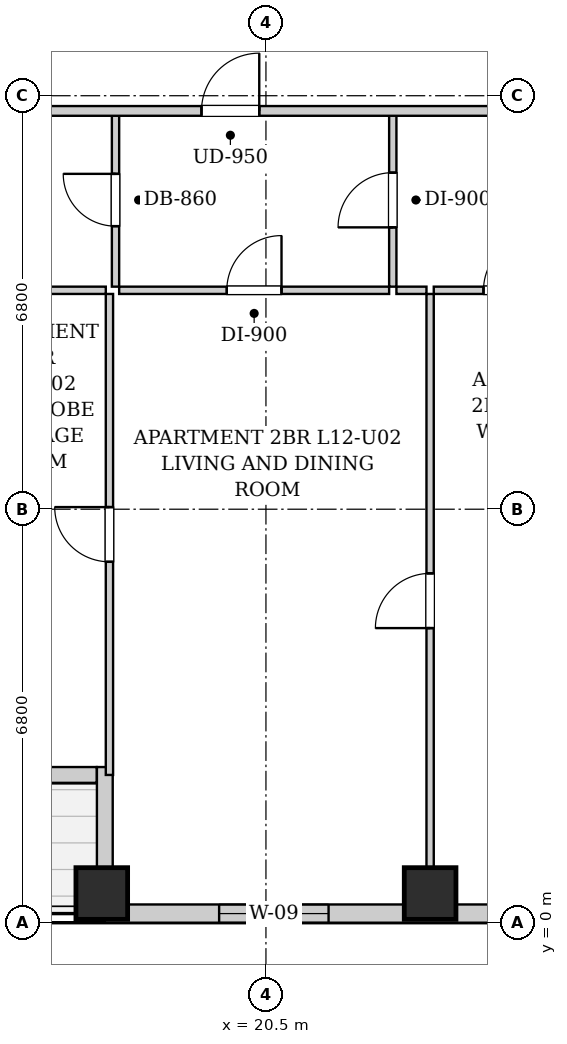
"""IFC4 building model, lengths in metres.
Left out: names, types, materials, properties, quantities, classifications, styles, units other than length and angle.
Written with IfcOpenShell. Run it as: python <this file> out.ifc"""

import sys

from ifc_helpers import new_model, si_unit, direction, frame, frame_2d, origin, origin_2d, place, context, subcontext, project, spatial, rectangle, extrude, element, fill, save


model = new_model("IFC4")
c1 = context("Model", 3, precision=1e-05, world=origin(), true_north=direction((0.0, 1.0)))
c2 = subcontext(c1, "Body", "Model", "MODEL_VIEW")
j1 = project(units=[si_unit("LENGTHUNIT", "METRE"), si_unit("PLANEANGLEUNIT", "RADIAN")], contexts=[c1])
p1 = place(None, origin())
s1 = spatial("IfcSite", under=j1, at=p1, CompositionType="ELEMENT")
p2 = place(p1, origin())
s2 = spatial("IfcBuilding", under=s1, at=p2, CompositionType="ELEMENT")
p3 = place(p2, frame((0.0, 0.0, 48.2)))
s3 = spatial("IfcBuildingStorey", under=s2, at=p3, CompositionType="ELEMENT", Elevation=48.2)
for number, where, z_axis, x_axis in (
    (1, (17.8, 0.48, 0.0), (0.0, 0.0, 1.0), (1.0, 0.0, 0.0)),
    (2, (23.2, 0.48, 0.0), (0.0, 0.0, 1.0), (1.0, 0.0, 0.0)),
):
    element("IfcColumn", number, at=place(p3, frame(where, z_axis=z_axis, x_axis=x_axis)), inside=s3, PredefinedType="COLUMN", context=c2, shape_type="SweptSolid", body=[
        extrude(rectangle(XDim=0.85, YDim=0.85, at=origin_2d()), origin(), (0.0, 0.0, 1.0), 3.2),
    ])
p4 = place(p3, frame((44.0, 0.15, 0.0), z_axis=(0.0, 0.0, 1.0), x_axis=(-1.0, 0.0, 0.0)))
e3 = element("IfcWall", 3, at=p4, inside=s3, PredefinedType="SOLIDWALL", context=c2, shape_type="SweptSolid", body=[
    extrude(rectangle(XDim=26.15, YDim=0.3, at=frame_2d((13.075, 0.0))), origin(), (0.0, 0.0, 1.0), 1.975),
])
p5 = place(p4, frame((22.47, 0.0, 0.55)))
e4 = element("IfcOpeningElement", 4, at=p5, cuts=e3, PredefinedType="OPENING", context=c2, shape_type="SweptSolid", body=[
    extrude(rectangle(XDim=1.8, YDim=1.2, at=frame_2d((0.9, 0.6))), frame((0.0, 0.16, 0.0), z_axis=(0.0, -1.0, 0.0), x_axis=(1.0, 0.0, 0.0)), (0.0, 0.0, 1.0), 0.32),
])
p6 = place(p4, frame((14.354, 0.0, 0.55)))
e5 = element("IfcOpeningElement", 5, at=p6, cuts=e3, PredefinedType="OPENING", context=c2, shape_type="SweptSolid", body=[
    extrude(rectangle(XDim=1.8, YDim=1.2, at=frame_2d((0.9, 0.6))), frame((0.0, 0.16, 0.0), z_axis=(0.0, -1.0, 0.0), x_axis=(1.0, 0.0, 0.0)), (0.0, 0.0, 1.0), 0.32),
])
p7 = place(p4, frame((11.385, 0.0, 0.55)))
e6 = element("IfcOpeningElement", 6, at=p7, cuts=e3, PredefinedType="OPENING", context=c2, shape_type="SweptSolid", body=[
    extrude(rectangle(XDim=1.35, YDim=1.2, at=frame_2d((0.675, 0.6))), frame((0.0, 0.16, 0.0), z_axis=(0.0, -1.0, 0.0), x_axis=(1.0, 0.0, 0.0)), (0.0, 0.0, 1.0), 0.32),
])
p8 = place(p4, frame((6.839, 0.0, 0.55)))
e7 = element("IfcOpeningElement", 7, at=p8, cuts=e3, PredefinedType="OPENING", context=c2, shape_type="SweptSolid", body=[
    extrude(rectangle(XDim=1.8, YDim=1.2, at=frame_2d((0.9, 0.6))), frame((0.0, 0.16, 0.0), z_axis=(0.0, -1.0, 0.0), x_axis=(1.0, 0.0, 0.0)), (0.0, 0.0, 1.0), 0.32),
])
p9 = place(p4, frame((2.332, 0.0, 0.55)))
e8 = element("IfcOpeningElement", 8, at=p9, cuts=e3, PredefinedType="OPENING", context=c2, shape_type="SweptSolid", body=[
    extrude(rectangle(XDim=1.8, YDim=1.2, at=frame_2d((0.9, 0.6))), frame((0.0, 0.16, 0.0), z_axis=(0.0, -1.0, 0.0), x_axis=(1.0, 0.0, 0.0)), (0.0, 0.0, 1.0), 0.32),
])
p10 = place(p3, frame((17.85, 0.16, 0.0), z_axis=(0.0, 0.0, 1.0), x_axis=(0.0, 1.0, 0.0)))
e9 = element("IfcWall", 9, at=p10, inside=s3, PredefinedType="SOLIDWALL", context=c2, shape_type="SweptSolid", body=[
    extrude(rectangle(XDim=2.4, YDim=0.26, at=frame_2d((1.2, 0.0))), origin(), (0.0, 0.0, 1.0), 2.232),
])
p11 = place(p3, frame((17.716, 2.43, 0.0), z_axis=(0.0, 0.0, 1.0), x_axis=(-1.0, 0.0, 0.0)))
e10 = element("IfcWall", 10, at=p11, inside=s3, PredefinedType="SOLIDWALL", context=c2, shape_type="SweptSolid", body=[
    extrude(rectangle(XDim=4.332, YDim=0.26, at=frame_2d((2.166, 0.0))), origin(), (0.0, 0.0, 1.0), 2.94),
])
p12 = place(p11, frame((0.95, 0.0, 0.0)))
e11 = element("IfcOpeningElement", 11, at=p12, cuts=e10, PredefinedType="OPENING", context=c2, shape_type="SweptSolid", body=[
    extrude(rectangle(XDim=1.1, YDim=2.0, at=frame_2d((0.55, 1.0))), frame((0.0, 0.14, 0.0), z_axis=(0.0, -1.0, 0.0), x_axis=(1.0, 0.0, 0.0)), (0.0, 0.0, 1.0), 0.28),
])
p13 = place(p3, frame((18.026, 10.46, 0.0), z_axis=(0.0, 0.0, 1.0), x_axis=(0.0, 1.0, 0.0)))
e12 = element("IfcWall", 12, at=p13, inside=s3, PredefinedType="PARTITIONING", context=c2, shape_type="SweptSolid", body=[
    extrude(rectangle(XDim=2.85, YDim=0.12, at=frame_2d((1.425, 0.0))), origin(), (0.0, 0.0, 1.0), 2.94),
])
p14 = place(p13, frame((0.995, 0.0, 0.0)))
e13 = element("IfcOpeningElement", 13, at=p14, cuts=e12, PredefinedType="OPENING", context=c2, shape_type="SweptSolid", body=[
    extrude(rectangle(XDim=0.86, YDim=2.05, at=frame_2d((0.43, 1.025))), frame((0.0, 0.07, 0.0), z_axis=(0.0, -1.0, 0.0), x_axis=(1.0, 0.0, 0.0)), (0.0, 0.0, 1.0), 0.14),
])
p15 = place(p3, frame((15.566, 10.4, 0.0), z_axis=(0.0, 0.0, 1.0), x_axis=(1.0, 0.0, 0.0)))
e14 = element("IfcWall", 14, at=p15, inside=s3, PredefinedType="PARTITIONING", context=c2, shape_type="SweptSolid", body=[
    extrude(rectangle(XDim=2.3, YDim=0.12, at=frame_2d((1.15, 0.0))), origin(), (0.0, 0.0, 1.0), 2.94),
])
p16 = place(p3, frame((22.586, 10.46, 0.0), z_axis=(0.0, 0.0, 1.0), x_axis=(0.0, 1.0, 0.0)))
e15 = element("IfcWall", 15, at=p16, inside=s3, PredefinedType="PARTITIONING", context=c2, shape_type="SweptSolid", body=[
    extrude(rectangle(XDim=2.85, YDim=0.12, at=frame_2d((1.425, 0.0))), origin(), (0.0, 0.0, 1.0), 2.94),
])
p17 = place(p16, frame((0.975, 0.0, 0.0)))
e16 = element("IfcOpeningElement", 16, at=p17, cuts=e15, PredefinedType="OPENING", context=c2, shape_type="SweptSolid", body=[
    extrude(rectangle(XDim=0.9, YDim=2.05, at=frame_2d((0.45, 1.025))), frame((0.0, 0.07, 0.0), z_axis=(0.0, -1.0, 0.0), x_axis=(1.0, 0.0, 0.0)), (0.0, 0.0, 1.0), 0.14),
])
p18 = place(p3, frame((18.086, 10.4, 0.0), z_axis=(0.0, 0.0, 1.0), x_axis=(1.0, 0.0, 0.0)))
e17 = element("IfcWall", 17, at=p18, inside=s3, PredefinedType="PARTITIONING", context=c2, shape_type="SweptSolid", body=[
    extrude(rectangle(XDim=4.44, YDim=0.12, at=frame_2d((2.22, 0.0))), origin(), (0.0, 0.0, 1.0), 2.94),
])
p19 = place(p18, frame((1.77, 0.0, 0.0)))
e18 = element("IfcOpeningElement", 18, at=p19, cuts=e17, PredefinedType="OPENING", context=c2, shape_type="SweptSolid", body=[
    extrude(rectangle(XDim=0.9, YDim=2.05, at=frame_2d((0.45, 1.025))), frame((0.0, 0.07, 0.0), z_axis=(0.0, -1.0, 0.0), x_axis=(1.0, 0.0, 0.0)), (0.0, 0.0, 1.0), 0.14),
])
p20 = place(p3, frame((22.646, 10.4, 0.0), z_axis=(0.0, 0.0, 1.0), x_axis=(1.0, 0.0, 0.0)))
e19 = element("IfcWall", 19, at=p20, inside=s3, PredefinedType="PARTITIONING", context=c2, shape_type="SweptSolid", body=[
    extrude(rectangle(XDim=0.494, YDim=0.12, at=frame_2d((0.247, 0.0))), origin(), (0.0, 0.0, 1.0), 2.94),
])
p21 = place(p3, frame((23.26, 10.4, 0.0), z_axis=(0.0, 0.0, 1.0), x_axis=(1.0, 0.0, 0.0)))
e20 = element("IfcWall", 20, at=p21, inside=s3, PredefinedType="PARTITIONING", context=c2, shape_type="SweptSolid", body=[
    extrude(rectangle(XDim=2.536, YDim=0.12, at=frame_2d((1.268, 0.0))), origin(), (0.0, 0.0, 1.0), 2.94),
])
p22 = place(p21, frame((0.818, 0.0, 0.0)))
e21 = element("IfcOpeningElement", 21, at=p22, cuts=e20, PredefinedType="OPENING", context=c2, shape_type="SweptSolid", body=[
    extrude(rectangle(XDim=0.9, YDim=2.05, at=frame_2d((0.45, 1.025))), frame((0.0, 0.07, 0.0), z_axis=(0.0, -1.0, 0.0), x_axis=(1.0, 0.0, 0.0)), (0.0, 0.0, 1.0), 0.14),
])
p23 = place(p3, frame((17.926, 2.43, 0.0), z_axis=(0.0, 0.0, 1.0), x_axis=(0.0, 1.0, 0.0)))
e22 = element("IfcWall", 22, at=p23, inside=s3, PredefinedType="PARTITIONING", context=c2, shape_type="SweptSolid", body=[
    extrude(rectangle(XDim=7.91, YDim=0.12, at=frame_2d((3.955, 0.0))), origin(), (0.0, 0.0, 1.0), 2.232),
])
p24 = place(p23, frame((3.505, 0.0, 0.0)))
e23 = element("IfcOpeningElement", 23, at=p24, cuts=e22, PredefinedType="OPENING", context=c2, shape_type="SweptSolid", body=[
    extrude(rectangle(XDim=0.9, YDim=2.05, at=frame_2d((0.45, 1.025))), frame((0.0, 0.07, 0.0), z_axis=(0.0, -1.0, 0.0), x_axis=(1.0, 0.0, 0.0)), (0.0, 0.0, 1.0), 0.14),
])
p25 = place(p3, frame((23.2, 0.28, 0.0), z_axis=(0.0, 0.0, 1.0), x_axis=(0.0, 1.0, 0.0)))
e24 = element("IfcWall", 24, at=p25, inside=s3, PredefinedType="PARTITIONING", context=c2, shape_type="SweptSolid", body=[
    extrude(rectangle(XDim=10.06, YDim=0.12, at=frame_2d((5.03, 0.0))), origin(), (0.0, 0.0, 1.0), 2.94),
])
p26 = place(p25, frame((4.565, 0.0, 0.0)))
e25 = element("IfcOpeningElement", 25, at=p26, cuts=e24, PredefinedType="OPENING", context=c2, shape_type="SweptSolid", body=[
    extrude(rectangle(XDim=0.9, YDim=2.05, at=frame_2d((0.45, 1.025))), frame((0.0, 0.07, 0.0), z_axis=(0.0, -1.0, 0.0), x_axis=(1.0, 0.0, 0.0)), (0.0, 0.0, 1.0), 0.14),
])
p27 = place(p3, frame((10.05, 13.35, 0.0), z_axis=(0.0, 0.0, 1.0), x_axis=(1.0, 0.0, 0.0)))
e26 = element("IfcWall", 26, at=p27, inside=s3, PredefinedType="PARTITIONING", context=c2, shape_type="SweptSolid", body=[
    extrude(rectangle(XDim=33.9, YDim=0.16, at=frame_2d((16.95, 0.0))), origin(), (0.0, 0.0, 1.0), 2.94),
])
p28 = place(p27, frame((3.203, 0.0, 0.0)))
e27 = element("IfcOpeningElement", 27, at=p28, cuts=e26, PredefinedType="OPENING", context=c2, shape_type="SweptSolid", body=[
    extrude(rectangle(XDim=0.95, YDim=2.1, at=frame_2d((0.475, 1.05))), frame((0.0, 0.09, 0.0), z_axis=(0.0, -1.0, 0.0), x_axis=(1.0, 0.0, 0.0)), (0.0, 0.0, 1.0), 0.18),
])
p29 = place(p27, frame((9.39, 0.0, 0.0)))
e28 = element("IfcOpeningElement", 28, at=p29, cuts=e26, PredefinedType="OPENING", context=c2, shape_type="SweptSolid", body=[
    extrude(rectangle(XDim=0.95, YDim=2.1, at=frame_2d((0.475, 1.05))), frame((0.0, 0.09, 0.0), z_axis=(0.0, -1.0, 0.0), x_axis=(1.0, 0.0, 0.0)), (0.0, 0.0, 1.0), 0.18),
])
p30 = place(p27, frame((28.476, 0.0, 0.0)))
e29 = element("IfcOpeningElement", 29, at=p30, cuts=e26, PredefinedType="OPENING", context=c2, shape_type="SweptSolid", body=[
    extrude(rectangle(XDim=0.95, YDim=2.1, at=frame_2d((0.475, 1.05))), frame((0.0, 0.09, 0.0), z_axis=(0.0, -1.0, 0.0), x_axis=(1.0, 0.0, 0.0)), (0.0, 0.0, 1.0), 0.18),
])
p31 = place(p14, origin())
e30 = element("IfcDoor", 30, at=p31, inside=s3, OperationType="SINGLE_SWING_RIGHT", PredefinedType="DOOR", context=c2, shape_type="SweptSolid", body=[
    extrude(rectangle(XDim=0.86, YDim=2.05, at=frame_2d((0.43, 1.025))), frame((0.0, 0.025, 0.0), z_axis=(0.0, -1.0, 0.0), x_axis=(1.0, 0.0, 0.0)), (0.0, 0.0, 1.0), 0.05),
])
fill(e13, e30)
p32 = place(p17, origin())
e31 = element("IfcDoor", 31, at=p32, inside=s3, OperationType="SINGLE_SWING_LEFT", PredefinedType="DOOR", context=c2, shape_type="SweptSolid", body=[
    extrude(rectangle(XDim=0.9, YDim=2.05, at=frame_2d((0.45, 1.025))), frame((0.0, 0.025, 0.0), z_axis=(0.0, -1.0, 0.0), x_axis=(1.0, 0.0, 0.0)), (0.0, 0.0, 1.0), 0.05),
])
fill(e16, e31)
p33 = place(p19, origin())
e32 = element("IfcDoor", 32, at=p33, inside=s3, OperationType="SINGLE_SWING_RIGHT", PredefinedType="DOOR", context=c2, shape_type="SweptSolid", body=[
    extrude(rectangle(XDim=0.9, YDim=2.05, at=frame_2d((0.45, 1.025))), frame((0.0, 0.025, 0.0), z_axis=(0.0, -1.0, 0.0), x_axis=(1.0, 0.0, 0.0)), (0.0, 0.0, 1.0), 0.05),
])
fill(e18, e32)
p34 = place(p22, origin())
e33 = element("IfcDoor", 33, at=p34, inside=s3, OperationType="SINGLE_SWING_RIGHT", PredefinedType="DOOR", context=c2, shape_type="SweptSolid", body=[
    extrude(rectangle(XDim=0.9, YDim=2.05, at=frame_2d((0.45, 1.025))), frame((0.0, 0.025, 0.0), z_axis=(0.0, -1.0, 0.0), x_axis=(1.0, 0.0, 0.0)), (0.0, 0.0, 1.0), 0.05),
])
fill(e21, e33)
p35 = place(p24, origin())
e34 = element("IfcDoor", 34, at=p35, inside=s3, OperationType="SINGLE_SWING_RIGHT", PredefinedType="DOOR", context=c2, shape_type="SweptSolid", body=[
    extrude(rectangle(XDim=0.9, YDim=2.05, at=frame_2d((0.45, 1.025))), frame((0.0, 0.025, 0.0), z_axis=(0.0, -1.0, 0.0), x_axis=(1.0, 0.0, 0.0)), (0.0, 0.0, 1.0), 0.05),
])
fill(e23, e34)
p36 = place(p26, origin())
e35 = element("IfcDoor", 35, at=p36, inside=s3, OperationType="SINGLE_SWING_LEFT", PredefinedType="DOOR", context=c2, shape_type="SweptSolid", body=[
    extrude(rectangle(XDim=0.9, YDim=2.05, at=frame_2d((0.45, 1.025))), frame((0.0, 0.025, 0.0), z_axis=(0.0, -1.0, 0.0), x_axis=(1.0, 0.0, 0.0)), (0.0, 0.0, 1.0), 0.05),
])
fill(e25, e35)
p37 = place(p29, origin())
e36 = element("IfcDoor", 36, at=p37, inside=s3, OperationType="SINGLE_SWING_RIGHT", PredefinedType="DOOR", context=c2, shape_type="SweptSolid", body=[
    extrude(rectangle(XDim=0.95, YDim=2.1, at=frame_2d((0.475, 1.05))), frame((0.0, 0.025, 0.0), z_axis=(0.0, -1.0, 0.0), x_axis=(1.0, 0.0, 0.0)), (0.0, 0.0, 1.0), 0.05),
])
fill(e28, e36)
p38 = place(p5, origin())
e37 = element("IfcWindow", 37, at=p38, inside=s3, PartitioningType="DOUBLE_PANEL_VERTICAL", PredefinedType="WINDOW", context=c2, shape_type="SweptSolid", body=[
    extrude(rectangle(XDim=1.8, YDim=1.2, at=frame_2d((0.9, 0.6))), frame((0.0, 0.03, 0.0), z_axis=(0.0, -1.0, 0.0), x_axis=(1.0, 0.0, 0.0)), (0.0, 0.0, 1.0), 0.06),
])
fill(e4, e37)
save(model, sys.argv[1])
